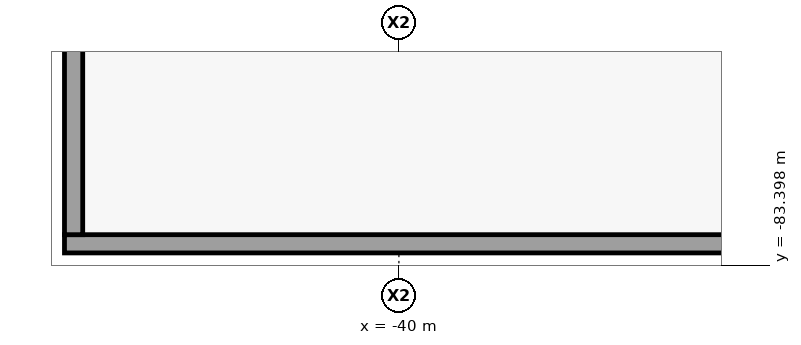
"""IFC4 building model, lengths in metres.
Left out: names, types, materials, properties, quantities, classifications, styles, units other than length and angle.
Written with IfcOpenShell. Run it as: python <this file> out.ifc"""

import sys

from ifc_helpers import new_model, si_unit, direction, frame, origin, place, context, subcontext, project, spatial, polyline, outline, extrude, element, save


model = new_model("IFC4")
c1 = context("Model", 3, precision=1e-05, world=origin(), true_north=direction((0.0, 1.0)))
c2 = subcontext(c1, "Body", "Model", "MODEL_VIEW")
j1 = project(units=[si_unit("LENGTHUNIT", "METRE"), si_unit("PLANEANGLEUNIT", "RADIAN")], contexts=[c1])
p1 = place(None, origin())
s1 = spatial("IfcSite", under=j1, at=p1, CompositionType="ELEMENT")
p2 = place(p1, origin())
s2 = spatial("IfcBuilding", under=s1, at=p2, CompositionType="ELEMENT")
p3 = place(p2, frame((0.0, 0.0, -4.5)))
s3 = spatial("IfcBuildingStorey", under=s2, at=p3, CompositionType="ELEMENT", Elevation=-4.5)
p4 = place(p3, frame((-51.0, -82.7, 0.0), z_axis=(0.0, 0.0, 1.0), x_axis=(1.0, 0.0, 0.0)))
e1 = element("IfcWall", 1, at=p4, inside=s3, PredefinedType="SOLIDWALL", context=c2, shape_type="SweptSolid", body=[
    extrude(outline(polyline([(0.0, -0.3), (0.0, 0.3), (0.6, 0.3), (101.4, 0.3), (102.0, 0.3), (102.0, -0.3), (0.0, -0.3)])), origin(), (0.0, 0.0, 1.0), 4.5),
])
p5 = place(p3, frame((-50.7, -1.0, 0.0), z_axis=(0.0, 0.0, 1.0), x_axis=(0.0, -1.0, 0.0)))
e2 = element("IfcWall", 2, at=p5, inside=s3, PredefinedType="SOLIDWALL", context=c2, shape_type="SweptSolid", body=[
    extrude(outline(polyline([(81.4, 0.3), (81.4, -0.3), (0.6, -0.3), (0.6, 0.3), (81.4, 0.3)])), origin(), (0.0, 0.0, 1.0), 4.5),
])
save(model, sys.argv[1])
